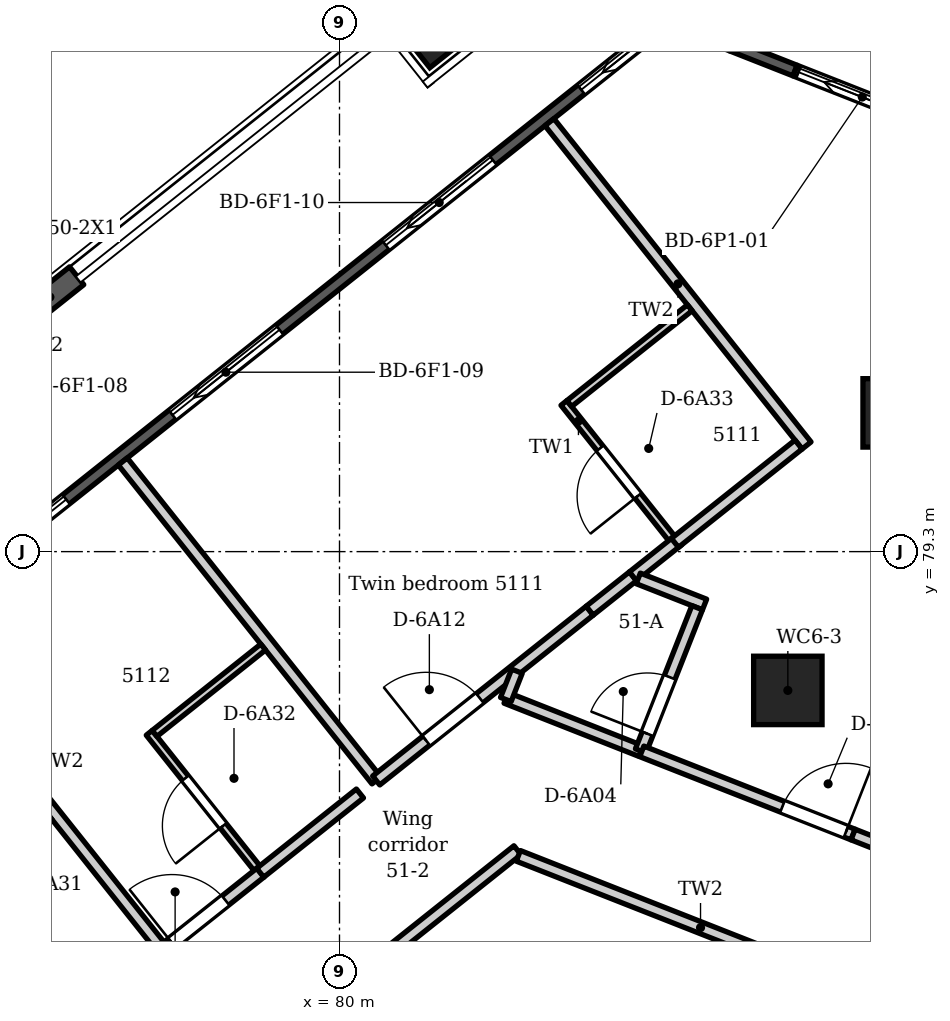
"""IFC4 building model, lengths in metres.
Left out: names, types, materials, properties, quantities, classifications, styles, units other than length and angle.
Written with IfcOpenShell. Run it as: python <this file> out.ifc"""

import sys

from ifc_helpers import new_model, si_unit, direction, frame, frame_2d, origin, origin_2d, place, context, subcontext, project, spatial, polyline, rectangle, circle, outline, extrude, element, fill, save


model = new_model("IFC4")
c1 = context("Model", 3, precision=1e-05, world=origin(), true_north=direction((0.0, 1.0)))
c2 = subcontext(c1, "Body", "Model", "MODEL_VIEW")
j1 = project(units=[si_unit("LENGTHUNIT", "METRE"), si_unit("PLANEANGLEUNIT", "RADIAN")], contexts=[c1])
p1 = place(None, origin())
s1 = spatial("IfcSite", under=j1, at=p1, CompositionType="ELEMENT")
p2 = place(p1, origin())
s2 = spatial("IfcBuilding", under=s1, at=p2, CompositionType="ELEMENT")
p3 = place(p2, frame((0.0, 0.0, 198.0)))
s3 = spatial("IfcBuildingStorey", under=s2, at=p3, CompositionType="ELEMENT", Elevation=198.0)
p4 = place(p3, frame((81.275, 86.119, -0.35), z_axis=(0.0, 0.0, 1.0), x_axis=(0.782608156852, 0.622514636638, 0.0)))
e1 = element("IfcColumn", 1, at=p4, inside=s3, PredefinedType="COLUMN", context=c2, shape_type="SweptSolid", body=[
    extrude(rectangle(XDim=0.7, YDim=0.6, at=origin_2d()), origin(), (0.0, 0.0, 1.0), 3.95),
])
for number, where, z_axis, x_axis in (
    (2, (85.898, 77.474, -0.35), (0.0, 0.0, 1.0), (1.0, 0.0, 0.0)),
    (3, (87.337, 81.125, -0.35), (0.0, 0.0, 1.0), (1.0, 0.0, 0.0)),
):
    element("IfcColumn", number, at=place(p3, frame(where, z_axis=z_axis, x_axis=x_axis)), inside=s3, PredefinedType="COLUMN", context=c2, shape_type="SweptSolid", body=[
        extrude(circle(Radius=0.45, at=origin_2d()), origin(), (0.0, 0.0, 1.0), 3.95),
    ])
p5 = place(p3, frame((54.651, 62.686, 0.0), z_axis=(0.0, 0.0, 1.0), x_axis=(0.782609620341, 0.622512796776, 0.0)))
e4 = element("IfcWall", 4, at=p5, inside=s3, PredefinedType="SOLIDWALL", context=c2, shape_type="SweptSolid", body=[
    extrude(outline(polyline([(0.149, 0.075), (0.149, -0.075), (39.297, -0.075), (39.297, 0.075), (0.149, 0.075)])), origin(), (0.0, 0.0, 1.0), 3.3),
])
p6 = place(p5, frame((1.193, 0.0, 0.0)))
e5 = element("IfcOpeningElement", 5, at=p6, cuts=e4, PredefinedType="OPENING", context=c2, shape_type="SweptSolid", body=[
    extrude(rectangle(XDim=1.8, YDim=2.6, at=frame_2d((0.9, 1.3))), frame((0.0, 0.085, 0.0), z_axis=(0.0, -1.0, 0.0), x_axis=(1.0, 0.0, 0.0)), (0.0, 0.0, 1.0), 0.17),
])
p7 = place(p5, frame((4.479, 0.0, 0.0)))
e6 = element("IfcOpeningElement", 6, at=p7, cuts=e4, PredefinedType="OPENING", context=c2, shape_type="SweptSolid", body=[
    extrude(rectangle(XDim=1.8, YDim=2.6, at=frame_2d((0.9, 1.3))), frame((0.0, 0.085, 0.0), z_axis=(0.0, -1.0, 0.0), x_axis=(1.0, 0.0, 0.0)), (0.0, 0.0, 1.0), 0.17),
])
p8 = place(p5, frame((8.065, 0.0, 0.0)))
e7 = element("IfcOpeningElement", 7, at=p8, cuts=e4, PredefinedType="OPENING", context=c2, shape_type="SweptSolid", body=[
    extrude(rectangle(XDim=1.8, YDim=2.6, at=frame_2d((0.9, 1.3))), frame((0.0, 0.085, 0.0), z_axis=(0.0, -1.0, 0.0), x_axis=(1.0, 0.0, 0.0)), (0.0, 0.0, 1.0), 0.17),
])
p9 = place(p5, frame((11.651, 0.0, 0.0)))
e8 = element("IfcOpeningElement", 8, at=p9, cuts=e4, PredefinedType="OPENING", context=c2, shape_type="SweptSolid", body=[
    extrude(rectangle(XDim=1.8, YDim=2.6, at=frame_2d((0.9, 1.3))), frame((0.0, 0.085, 0.0), z_axis=(0.0, -1.0, 0.0), x_axis=(1.0, 0.0, 0.0)), (0.0, 0.0, 1.0), 0.17),
])
p10 = place(p5, frame((15.237, 0.0, 0.0)))
e9 = element("IfcOpeningElement", 9, at=p10, cuts=e4, PredefinedType="OPENING", context=c2, shape_type="SweptSolid", body=[
    extrude(rectangle(XDim=1.8, YDim=2.6, at=frame_2d((0.9, 1.3))), frame((0.0, 0.085, 0.0), z_axis=(0.0, -1.0, 0.0), x_axis=(1.0, 0.0, 0.0)), (0.0, 0.0, 1.0), 0.17),
])
p11 = place(p5, frame((18.823, 0.0, 0.0)))
e10 = element("IfcOpeningElement", 10, at=p11, cuts=e4, PredefinedType="OPENING", context=c2, shape_type="SweptSolid", body=[
    extrude(rectangle(XDim=1.8, YDim=2.6, at=frame_2d((0.9, 1.3))), frame((0.0, 0.085, 0.0), z_axis=(0.0, -1.0, 0.0), x_axis=(1.0, 0.0, 0.0)), (0.0, 0.0, 1.0), 0.17),
])
p12 = place(p5, frame((22.409, 0.0, 0.0)))
e11 = element("IfcOpeningElement", 11, at=p12, cuts=e4, PredefinedType="OPENING", context=c2, shape_type="SweptSolid", body=[
    extrude(rectangle(XDim=1.8, YDim=2.6, at=frame_2d((0.9, 1.3))), frame((0.0, 0.085, 0.0), z_axis=(0.0, -1.0, 0.0), x_axis=(1.0, 0.0, 0.0)), (0.0, 0.0, 1.0), 0.17),
])
p13 = place(p5, frame((25.995, 0.0, 0.0)))
e12 = element("IfcOpeningElement", 12, at=p13, cuts=e4, PredefinedType="OPENING", context=c2, shape_type="SweptSolid", body=[
    extrude(rectangle(XDim=1.8, YDim=2.6, at=frame_2d((0.9, 1.3))), frame((0.0, 0.085, 0.0), z_axis=(0.0, -1.0, 0.0), x_axis=(1.0, 0.0, 0.0)), (0.0, 0.0, 1.0), 0.17),
])
p14 = place(p5, frame((29.581, 0.0, 0.0)))
e13 = element("IfcOpeningElement", 13, at=p14, cuts=e4, PredefinedType="OPENING", context=c2, shape_type="SweptSolid", body=[
    extrude(rectangle(XDim=1.8, YDim=2.6, at=frame_2d((0.9, 1.3))), frame((0.0, 0.085, 0.0), z_axis=(0.0, -1.0, 0.0), x_axis=(1.0, 0.0, 0.0)), (0.0, 0.0, 1.0), 0.17),
])
p15 = place(p5, frame((33.167, 0.0, 0.0)))
e14 = element("IfcOpeningElement", 14, at=p15, cuts=e4, PredefinedType="OPENING", context=c2, shape_type="SweptSolid", body=[
    extrude(rectangle(XDim=1.8, YDim=2.6, at=frame_2d((0.9, 1.3))), frame((0.0, 0.085, 0.0), z_axis=(0.0, -1.0, 0.0), x_axis=(1.0, 0.0, 0.0)), (0.0, 0.0, 1.0), 0.17),
])
p16 = place(p5, frame((36.453, 0.0, 0.0)))
e15 = element("IfcOpeningElement", 15, at=p16, cuts=e4, PredefinedType="OPENING", context=c2, shape_type="SweptSolid", body=[
    extrude(rectangle(XDim=1.8, YDim=2.6, at=frame_2d((0.9, 1.3))), frame((0.0, 0.085, 0.0), z_axis=(0.0, -1.0, 0.0), x_axis=(1.0, 0.0, 0.0)), (0.0, 0.0, 1.0), 0.17),
])
p17 = place(p3, frame((85.063, 85.995, 0.0), z_axis=(0.0, 0.0, 1.0), x_axis=(0.930433620143, -0.366460473323, 0.0)))
e16 = element("IfcWall", 16, at=p17, inside=s3, PredefinedType="SOLIDWALL", context=c2, shape_type="SweptSolid", body=[
    extrude(outline(polyline([(0.11, -0.075), (1.0, -0.075), (1.0, 0.075), (0.11, 0.075), (0.11, -0.075)])), origin(), (0.0, 0.0, 1.0), 3.3),
])
p18 = place(p3, frame((85.994, 85.629, 0.0), z_axis=(0.0, 0.0, 1.0), x_axis=(0.930387146689, -0.366578446279, 0.0)))
e17 = element("IfcWall", 17, at=p18, inside=s3, PredefinedType="SOLIDWALL", context=c2, shape_type="SweptSolid", body=[
    extrude(outline(polyline([(0.0, -0.075), (1.9, -0.075), (1.9, 0.075), (0.0, 0.075), (0.0, -0.075)])), origin(), (0.0, 0.0, 1.0), 2.7),
])
p19 = place(p18, frame((0.05, 0.0, 0.0)))
e18 = element("IfcOpeningElement", 18, at=p19, cuts=e17, PredefinedType="OPENING", context=c2, shape_type="SweptSolid", body=[
    extrude(rectangle(XDim=1.8, YDim=2.6, at=frame_2d((0.9, 1.3))), frame((0.0, 0.085, 0.0), z_axis=(0.0, -1.0, 0.0), x_axis=(1.0, 0.0, 0.0)), (0.0, 0.0, 1.0), 0.17),
])
p20 = place(p3, origin())
e19 = element("IfcWall", 19, at=p20, inside=s3, PredefinedType="PARAPET", context=c2, shape_type="SweptSolid", body=[
    extrude(outline(polyline([(75.744, 82.486), (75.931, 82.251), (76.635, 82.812), (76.449, 83.046), (76.205, 82.853), (75.744, 82.486)])), origin(), (0.0, 0.0, 1.0), 1.1),
])
p21 = place(p3, frame((74.343, 78.253, 0.0), z_axis=(0.0, 0.0, 1.0), x_axis=(0.622444463897, -0.782663969634, 0.0)))
e20 = element("IfcWall", 20, at=p21, inside=s3, PredefinedType="PARTITIONING", context=c2, shape_type="SweptSolid", body=[
    extrude(rectangle(XDim=5.284, YDim=0.15, at=frame_2d((2.642, 0.0))), origin(), (0.0, 0.0, 1.0), 3.3),
])
p22 = place(p3, frame((77.149, 80.486, 0.0), z_axis=(0.0, 0.0, 1.0), x_axis=(0.622587598128, -0.782550115109, 0.0)))
e21 = element("IfcWall", 21, at=p22, inside=s3, PredefinedType="PARTITIONING", context=c2, shape_type="SweptSolid", body=[
    extrude(rectangle(XDim=5.36, YDim=0.15, at=frame_2d((2.68, 0.0))), origin(), (0.0, 0.0, 1.0), 3.3),
])
p23 = place(p3, frame((77.497, 76.916, 0.0), z_axis=(0.0, 0.0, 1.0), x_axis=(0.622625135388, -0.78252024944, 0.0)))
e22 = element("IfcWall", 22, at=p23, inside=s3, PredefinedType="PARTITIONING", context=c2, shape_type="SweptSolid", body=[
    extrude(rectangle(XDim=2.275, YDim=0.1, at=frame_2d((1.138, 0.0))), origin(), (0.0, 0.0, 1.0), 3.3),
])
p24 = place(p23, frame((0.763, 0.0, 0.0)))
e23 = element("IfcOpeningElement", 23, at=p24, cuts=e22, PredefinedType="OPENING", context=c2, shape_type="SweptSolid", body=[
    extrude(rectangle(XDim=0.8, YDim=2.1, at=frame_2d((0.4, 1.05))), frame((0.0, 0.06, 0.0), z_axis=(0.0, -1.0, 0.0), x_axis=(1.0, 0.0, 0.0)), (0.0, 0.0, 1.0), 0.12),
])
p25 = place(p3, frame((77.567, 76.908, 0.0), z_axis=(0.0, 0.0, 1.0), x_axis=(0.782627716851, 0.622490045557, 0.0)))
e24 = element("IfcWall", 24, at=p25, inside=s3, PredefinedType="PARTITIONING", context=c2, shape_type="SweptSolid", body=[
    extrude(rectangle(XDim=1.825, YDim=0.1, at=frame_2d((0.913, 0.0))), origin(), (0.0, 0.0, 1.0), 3.3),
])
p26 = place(p3, frame((77.676, 74.056, 0.0), z_axis=(0.0, 0.0, 1.0), x_axis=(0.782734219596, 0.622356121102, 0.0)))
e25 = element("IfcWall", 25, at=p26, inside=s3, PredefinedType="PARTITIONING", context=c2, shape_type="SweptSolid", body=[
    extrude(rectangle(XDim=1.644, YDim=0.15, at=frame_2d((0.822, 0.0))), origin(), (0.0, 0.0, 1.0), 3.3),
])
p27 = place(p26, frame((0.154, 0.0, 0.0)))
e26 = element("IfcOpeningElement", 26, at=p27, cuts=e25, PredefinedType="OPENING", context=c2, shape_type="SweptSolid", body=[
    extrude(rectangle(XDim=0.9, YDim=2.1, at=frame_2d((0.45, 1.05))), frame((0.0, 0.085, 0.0), z_axis=(0.0, -1.0, 0.0), x_axis=(1.0, 0.0, 0.0)), (0.0, 0.0, 1.0), 0.17),
])
p28 = place(p3, frame((78.957, 75.075, 0.0), z_axis=(0.0, 0.0, 1.0), x_axis=(0.782797783459, 0.622276168764, 0.0)))
e27 = element("IfcWall", 27, at=p28, inside=s3, PredefinedType="PARTITIONING", context=c2, shape_type="SweptSolid", body=[
    extrude(rectangle(XDim=1.676, YDim=0.15, at=frame_2d((0.838, 0.0))), origin(), (0.0, 0.0, 1.0), 3.3),
])
p29 = place(p3, frame((79.263, 72.922, 0.0), z_axis=(0.0, 0.0, 1.0), x_axis=(0.782518607784, 0.622627198629, 0.0)))
e28 = element("IfcWall", 28, at=p29, inside=s3, PredefinedType="PARTITIONING", context=c2, shape_type="SweptSolid", body=[
    extrude(rectangle(XDim=3.935, YDim=0.15, at=frame_2d((1.967, 0.0))), origin(), (0.0, 0.0, 1.0), 3.3),
])
p30 = place(p3, frame((80.483, 76.289, 0.0), z_axis=(0.0, 0.0, 1.0), x_axis=(0.782683898342, 0.622419404643, 0.0)))
e29 = element("IfcWall", 29, at=p30, inside=s3, PredefinedType="PARTITIONING", context=c2, shape_type="SweptSolid", body=[
    extrude(rectangle(XDim=3.589, YDim=0.15, at=frame_2d((1.794, 0.0))), origin(), (0.0, 0.0, 1.0), 3.3),
])
p31 = place(p30, frame((0.841, 0.0, 0.0)))
e30 = element("IfcOpeningElement", 30, at=p31, cuts=e29, PredefinedType="OPENING", context=c2, shape_type="SweptSolid", body=[
    extrude(rectangle(XDim=0.9, YDim=2.1, at=frame_2d((0.45, 1.05))), frame((0.0, 0.085, 0.0), z_axis=(0.0, -1.0, 0.0), x_axis=(1.0, 0.0, 0.0)), (0.0, 0.0, 1.0), 0.17),
])
p32 = place(p3, frame((82.192, 77.376, 0.0), z_axis=(0.0, 0.0, 1.0), x_axis=(0.93022308185, -0.366994574882, 0.0)))
e31 = element("IfcWall", 31, at=p32, inside=s3, PredefinedType="PARTITIONING", context=c2, shape_type="SweptSolid", body=[
    extrude(rectangle(XDim=1.907, YDim=0.15, at=frame_2d((0.954, 0.0))), origin(), (0.0, 0.0, 1.0), 3.3),
])
p33 = place(p3, frame((82.188, 77.354, 0.0), z_axis=(0.0, 0.0, 1.0), x_axis=(0.365066779339, 0.930981335271, 0.0)))
e32 = element("IfcWall", 32, at=p33, inside=s3, PredefinedType="PARTITIONING", context=c2, shape_type="SweptSolid", body=[
    extrude(rectangle(XDim=0.4, YDim=0.15, at=frame_2d((0.2, 0.0))), origin(), (0.0, 0.0, 1.0), 3.3),
])
p34 = place(p3, frame((82.353, 75.298, 0.0), z_axis=(0.0, 0.0, 1.0), x_axis=(0.930366278921, -0.366631404883, 0.0)))
e33 = element("IfcWall", 33, at=p34, inside=s3, PredefinedType="PARTITIONING", context=c2, shape_type="SweptSolid", body=[
    extrude(rectangle(XDim=5.153, YDim=0.15, at=frame_2d((2.576, 0.0))), origin(), (0.0, 0.0, 1.0), 2.8),
])
p35 = place(p3, frame((82.762, 84.95, 0.0), z_axis=(0.0, 0.0, 1.0), x_axis=(0.622457280045, -0.782653776915, 0.0)))
e34 = element("IfcWall", 34, at=p35, inside=s3, PredefinedType="PARTITIONING", context=c2, shape_type="SweptSolid", body=[
    extrude(rectangle(XDim=5.435, YDim=0.15, at=frame_2d((2.717, 0.0))), origin(), (0.0, 0.0, 1.0), 3.3),
])
p36 = place(p3, frame((82.953, 81.256, 0.0), z_axis=(0.0, 0.0, 1.0), x_axis=(0.622572854105, -0.782561845052, 0.0)))
e35 = element("IfcWall", 35, at=p36, inside=s3, PredefinedType="PARTITIONING", context=c2, shape_type="SweptSolid", body=[
    extrude(rectangle(XDim=2.275, YDim=0.1, at=frame_2d((1.138, 0.0))), origin(), (0.0, 0.0, 1.0), 3.3),
])
p37 = place(p36, frame((0.763, 0.0, 0.0)))
e36 = element("IfcOpeningElement", 36, at=p37, cuts=e35, PredefinedType="OPENING", context=c2, shape_type="SweptSolid", body=[
    extrude(rectangle(XDim=0.8, YDim=2.1, at=frame_2d((0.4, 1.05))), frame((0.0, 0.06, 0.0), z_axis=(0.0, -1.0, 0.0), x_axis=(1.0, 0.0, 0.0)), (0.0, 0.0, 1.0), 0.12),
])
p38 = place(p3, frame((83.023, 81.248, 0.0), z_axis=(0.0, 0.0, 1.0), x_axis=(0.782770551169, 0.622310424324, 0.0)))
e37 = element("IfcWall", 37, at=p38, inside=s3, PredefinedType="PARTITIONING", context=c2, shape_type="SweptSolid", body=[
    extrude(rectangle(XDim=2.025, YDim=0.1, at=frame_2d((1.013, 0.0))), origin(), (0.0, 0.0, 1.0), 3.3),
])
p39 = place(p3, frame((83.292, 78.523, 0.0), z_axis=(0.0, 0.0, 1.0), x_axis=(0.782961678727, 0.622069939512, 0.0)))
e38 = element("IfcWall", 38, at=p39, inside=s3, PredefinedType="PARTITIONING", context=c2, shape_type="SweptSolid", body=[
    extrude(rectangle(XDim=0.727, YDim=0.15, at=frame_2d((0.363, 0.0))), origin(), (0.0, 0.0, 1.0), 3.3),
])
p40 = place(p3, frame((83.861, 78.975, 0.0), z_axis=(0.0, 0.0, 1.0), x_axis=(0.782427401713, 0.622741809298, 0.0)))
e39 = element("IfcWall", 39, at=p40, inside=s3, PredefinedType="PARTITIONING", context=c2, shape_type="SweptSolid", body=[
    extrude(rectangle(XDim=0.763, YDim=0.15, at=frame_2d((0.381, 0.0))), origin(), (0.0, 0.0, 1.0), 3.3),
])
p41 = place(p3, frame((83.931, 78.948, 0.0), z_axis=(0.0, 0.0, 1.0), x_axis=(0.930564496223, -0.366128008175, 0.0)))
e40 = element("IfcWall", 40, at=p41, inside=s3, PredefinedType="PARTITIONING", context=c2, shape_type="SweptSolid", body=[
    extrude(rectangle(XDim=0.937, YDim=0.15, at=frame_2d((0.468, 0.0))), origin(), (0.0, 0.0, 1.0), 3.3),
])
p42 = place(p3, frame((83.963, 76.678, 0.0), z_axis=(0.0, 0.0, 1.0), x_axis=(0.366688940458, 0.9303436037, 0.0)))
e41 = element("IfcWall", 41, at=p42, inside=s3, PredefinedType="PARTITIONING", context=c2, shape_type="SweptSolid", body=[
    extrude(rectangle(XDim=2.025, YDim=0.15, at=frame_2d((1.013, 0.0))), origin(), (0.0, 0.0, 1.0), 3.3),
])
p43 = place(p42, frame((0.243, 0.0, 0.0)))
e42 = element("IfcOpeningElement", 42, at=p43, cuts=e41, PredefinedType="OPENING", context=c2, shape_type="SweptSolid", body=[
    extrude(rectangle(XDim=0.8, YDim=2.1, at=frame_2d((0.4, 1.05))), frame((0.0, 0.085, 0.0), z_axis=(0.0, -1.0, 0.0), x_axis=(1.0, 0.0, 0.0)), (0.0, 0.0, 1.0), 0.17),
])
p44 = place(p3, frame((83.977, 76.672, 0.0), z_axis=(0.0, 0.0, 1.0), x_axis=(0.930513911047, -0.36625655127, 0.0)))
e43 = element("IfcWall", 43, at=p44, inside=s3, PredefinedType="PARTITIONING", context=c2, shape_type="SweptSolid", body=[
    extrude(rectangle(XDim=2.988, YDim=0.15, at=frame_2d((1.494, 0.0))), origin(), (0.0, 0.0, 1.0), 2.8),
])
p45 = place(p44, frame((1.988, 0.0, 0.0)))
e44 = element("IfcOpeningElement", 44, at=p45, cuts=e43, PredefinedType="OPENING", context=c2, shape_type="SweptSolid", body=[
    extrude(rectangle(XDim=0.9, YDim=2.1, at=frame_2d((0.45, 1.05))), frame((0.0, 0.085, 0.0), z_axis=(0.0, -1.0, 0.0), x_axis=(1.0, 0.0, 0.0)), (0.0, 0.0, 1.0), 0.17),
])
p46 = place(p3, frame((84.413, 79.415, 0.0), z_axis=(0.0, 0.0, 1.0), x_axis=(0.782688216637, 0.622413974407, 0.0)))
e45 = element("IfcWall", 45, at=p46, inside=s3, PredefinedType="PARTITIONING", context=c2, shape_type="SweptSolid", body=[
    extrude(rectangle(XDim=2.078, YDim=0.15, at=frame_2d((1.039, 0.0))), origin(), (0.0, 0.0, 1.0), 3.3),
])
p47 = place(p3, frame((86.757, 75.578, 0.0), z_axis=(0.0, 0.0, 1.0), x_axis=(0.930344172236, -0.366687497997, 0.0)))
e46 = element("IfcWall", 46, at=p47, inside=s3, PredefinedType="PARTITIONING", context=c2, shape_type="SweptSolid", body=[
    extrude(rectangle(XDim=2.24, YDim=0.15, at=frame_2d((1.12, 0.0))), origin(), (0.0, 0.0, 1.0), 3.3),
])
p48 = place(p13, origin())
e47 = element("IfcDoor", 47, at=p48, inside=s3, OperationType="SLIDING_TO_LEFT", PredefinedType="DOOR", context=c2, shape_type="SweptSolid", body=[
    extrude(rectangle(XDim=1.8, YDim=2.6, at=frame_2d((0.9, 1.3))), frame((0.0, 0.025, 0.0), z_axis=(0.0, -1.0, 0.0), x_axis=(1.0, 0.0, 0.0)), (0.0, 0.0, 1.0), 0.05),
])
fill(e12, e47)
p49 = place(p14, origin())
e48 = element("IfcDoor", 48, at=p49, inside=s3, OperationType="SLIDING_TO_LEFT", PredefinedType="DOOR", context=c2, shape_type="SweptSolid", body=[
    extrude(rectangle(XDim=1.8, YDim=2.6, at=frame_2d((0.9, 1.3))), frame((0.0, 0.025, 0.0), z_axis=(0.0, -1.0, 0.0), x_axis=(1.0, 0.0, 0.0)), (0.0, 0.0, 1.0), 0.05),
])
fill(e13, e48)
p50 = place(p15, origin())
e49 = element("IfcDoor", 49, at=p50, inside=s3, OperationType="SLIDING_TO_LEFT", PredefinedType="DOOR", context=c2, shape_type="SweptSolid", body=[
    extrude(rectangle(XDim=1.8, YDim=2.6, at=frame_2d((0.9, 1.3))), frame((0.0, 0.025, 0.0), z_axis=(0.0, -1.0, 0.0), x_axis=(1.0, 0.0, 0.0)), (0.0, 0.0, 1.0), 0.05),
])
fill(e14, e49)
p51 = place(p16, origin())
e50 = element("IfcDoor", 50, at=p51, inside=s3, OperationType="SLIDING_TO_LEFT", PredefinedType="DOOR", context=c2, shape_type="SweptSolid", body=[
    extrude(rectangle(XDim=1.8, YDim=2.6, at=frame_2d((0.9, 1.3))), frame((0.0, 0.025, 0.0), z_axis=(0.0, -1.0, 0.0), x_axis=(1.0, 0.0, 0.0)), (0.0, 0.0, 1.0), 0.05),
])
fill(e15, e50)
p52 = place(p19, origin())
e51 = element("IfcDoor", 51, at=p52, inside=s3, OperationType="SLIDING_TO_LEFT", PredefinedType="DOOR", context=c2, shape_type="SweptSolid", body=[
    extrude(rectangle(XDim=1.8, YDim=2.6, at=frame_2d((0.9, 1.3))), frame((0.0, 0.025, 0.0), z_axis=(0.0, -1.0, 0.0), x_axis=(1.0, 0.0, 0.0)), (0.0, 0.0, 1.0), 0.05),
])
fill(e18, e51)
p53 = place(p45, origin())
e52 = element("IfcDoor", 52, at=p53, inside=s3, OperationType="SINGLE_SWING_RIGHT", PredefinedType="DOOR", context=c2, shape_type="SweptSolid", body=[
    extrude(rectangle(XDim=0.9, YDim=2.1, at=frame_2d((0.45, 1.05))), frame((0.0, 0.025, 0.0), z_axis=(0.0, -1.0, 0.0), x_axis=(1.0, 0.0, 0.0)), (0.0, 0.0, 1.0), 0.05),
])
fill(e44, e52)
p54 = place(p43, origin())
e53 = element("IfcDoor", 53, at=p54, inside=s3, OperationType="SINGLE_SWING_LEFT", PredefinedType="DOOR", context=c2, shape_type="SweptSolid", body=[
    extrude(rectangle(XDim=0.8, YDim=2.1, at=frame_2d((0.4, 1.05))), frame((0.0, 0.025, 0.0), z_axis=(0.0, -1.0, 0.0), x_axis=(1.0, 0.0, 0.0)), (0.0, 0.0, 1.0), 0.05),
])
fill(e42, e53)
p55 = place(p27, origin())
e54 = element("IfcDoor", 54, at=p55, inside=s3, OperationType="SINGLE_SWING_LEFT", PredefinedType="DOOR", context=c2, shape_type="SweptSolid", body=[
    extrude(rectangle(XDim=0.9, YDim=2.1, at=frame_2d((0.45, 1.05))), frame((0.0, 0.025, 0.0), z_axis=(0.0, -1.0, 0.0), x_axis=(1.0, 0.0, 0.0)), (0.0, 0.0, 1.0), 0.05),
])
fill(e26, e54)
p56 = place(p31, origin())
e55 = element("IfcDoor", 55, at=p56, inside=s3, OperationType="SINGLE_SWING_LEFT", PredefinedType="DOOR", context=c2, shape_type="SweptSolid", body=[
    extrude(rectangle(XDim=0.9, YDim=2.1, at=frame_2d((0.45, 1.05))), frame((0.0, 0.025, 0.0), z_axis=(0.0, -1.0, 0.0), x_axis=(1.0, 0.0, 0.0)), (0.0, 0.0, 1.0), 0.05),
])
fill(e30, e55)
p57 = place(p24, frame((0.8, 0.0, 0.0), z_axis=(0.0, 0.0, 1.0), x_axis=(-1.0, 0.0, 0.0)))
e56 = element("IfcDoor", 56, at=p57, inside=s3, OperationType="SINGLE_SWING_LEFT", PredefinedType="DOOR", context=c2, shape_type="SweptSolid", body=[
    extrude(rectangle(XDim=0.8, YDim=2.1, at=frame_2d((0.4, 1.05))), frame((0.0, 0.025, 0.0), z_axis=(0.0, -1.0, 0.0), x_axis=(1.0, 0.0, 0.0)), (0.0, 0.0, 1.0), 0.05),
])
fill(e23, e56)
p58 = place(p37, frame((0.8, 0.0, 0.0), z_axis=(0.0, 0.0, 1.0), x_axis=(-1.0, 0.0, 0.0)))
e57 = element("IfcDoor", 57, at=p58, inside=s3, OperationType="SINGLE_SWING_LEFT", PredefinedType="DOOR", context=c2, shape_type="SweptSolid", body=[
    extrude(rectangle(XDim=0.8, YDim=2.1, at=frame_2d((0.4, 1.05))), frame((0.0, 0.025, 0.0), z_axis=(0.0, -1.0, 0.0), x_axis=(1.0, 0.0, 0.0)), (0.0, 0.0, 1.0), 0.05),
])
fill(e36, e57)
save(model, sys.argv[1])
